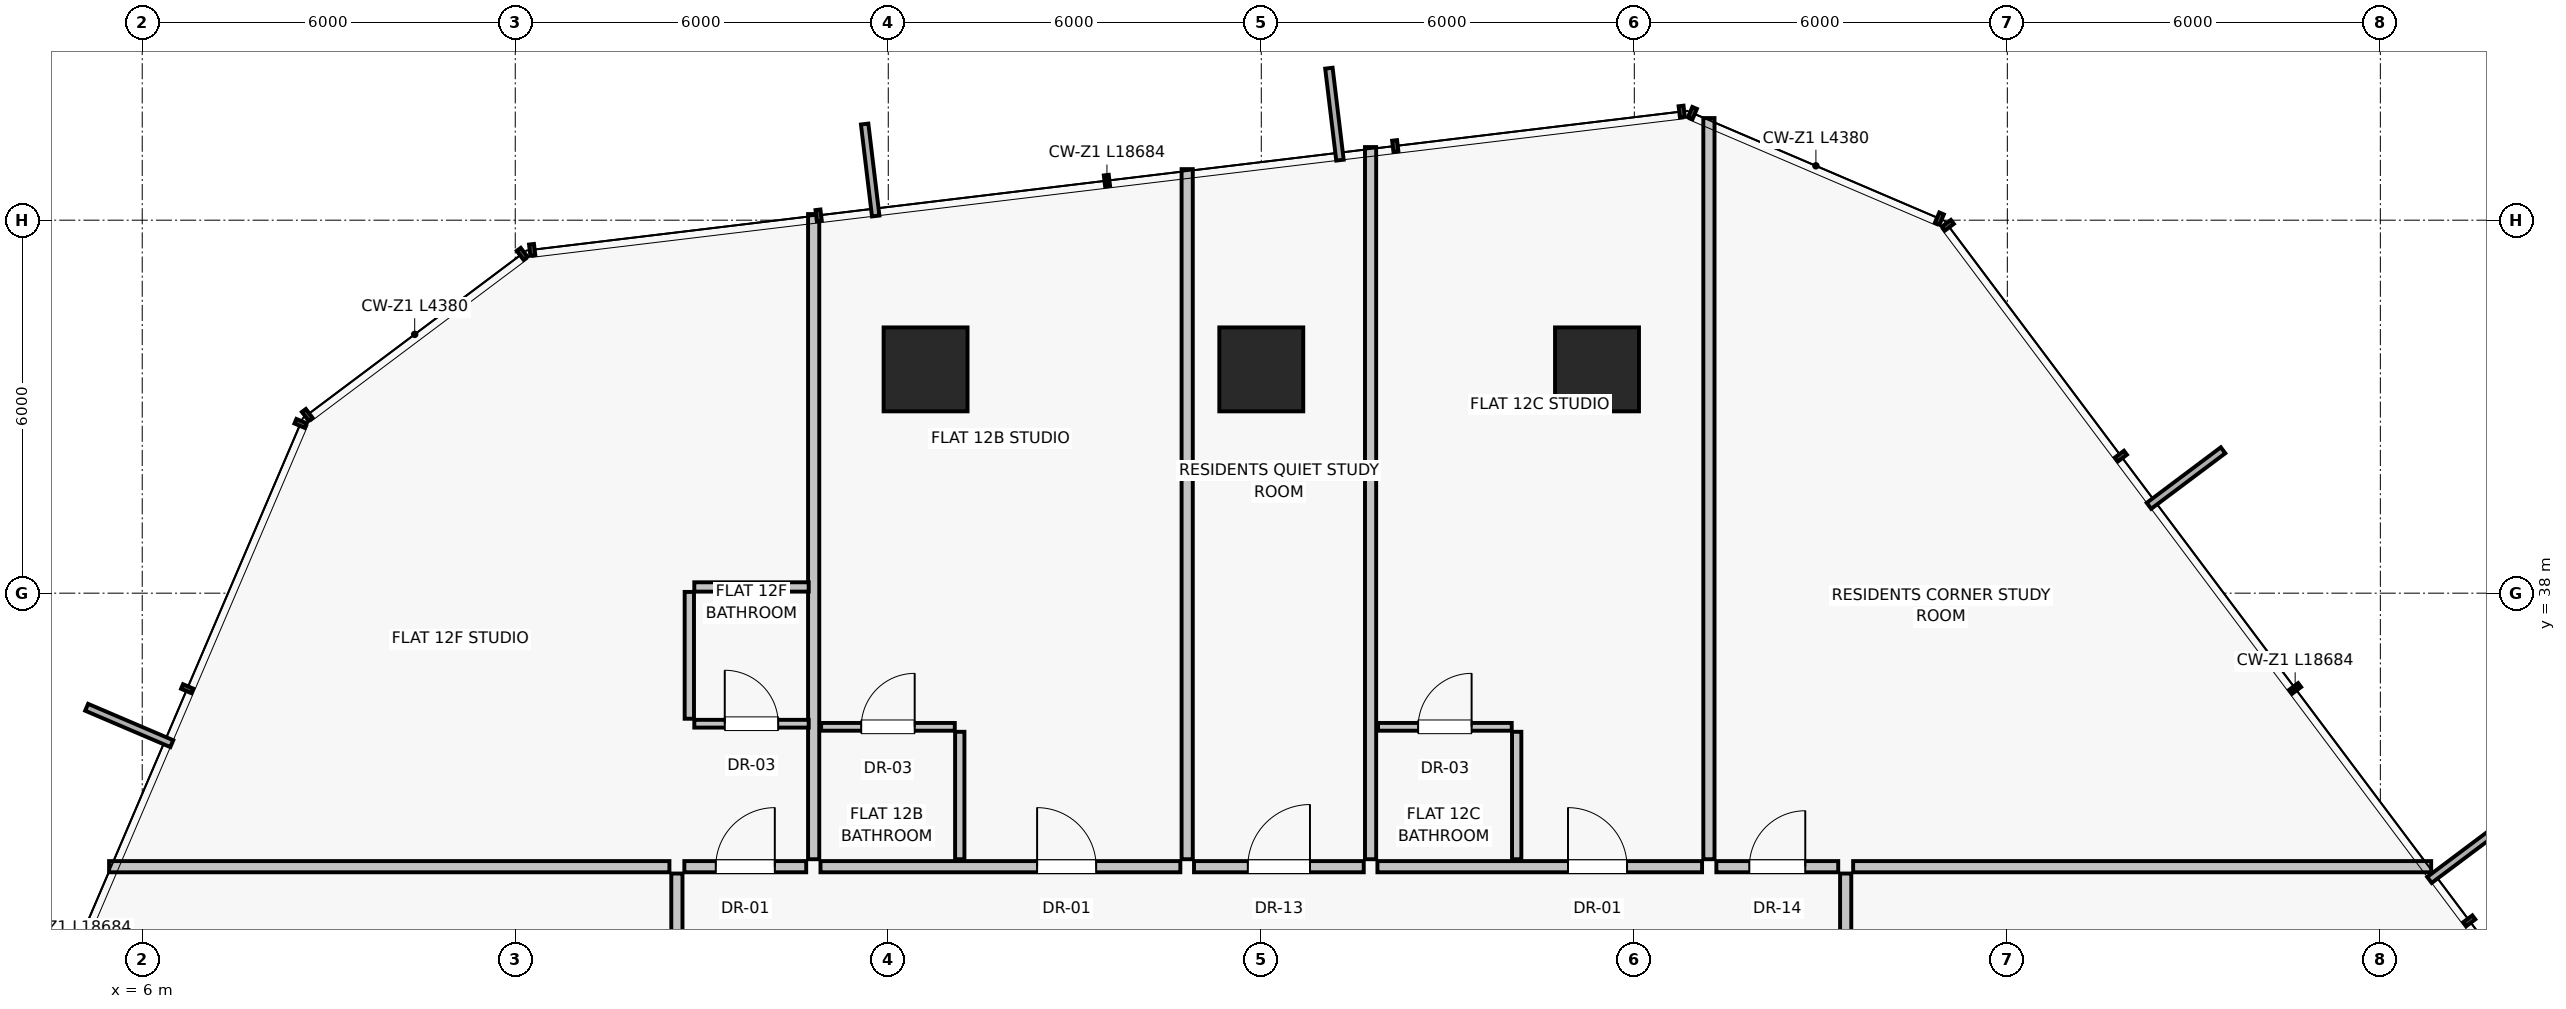
"""IFC4 building model, lengths in metres.
Left out: names, types, materials, properties, quantities, classifications, styles, units other than length and angle.
Written with IfcOpenShell. Run it as: python <this file> out.ifc"""

import sys

from ifc_helpers import new_model, si_unit, direction, frame, frame_2d, origin, origin_2d, place, context, subcontext, project, spatial, rectangle, extrude, source, transform, mapped, element, fill, save


model = new_model("IFC4")
c1 = context("Model", 3, precision=1e-05, world=origin(), true_north=direction((0.0, 1.0)))
c2 = subcontext(c1, "Body", "Model", "MODEL_VIEW")
j1 = project(units=[si_unit("LENGTHUNIT", "METRE"), si_unit("PLANEANGLEUNIT", "RADIAN")], contexts=[c1])
p1 = place(None, origin())
s1 = spatial("IfcSite", under=j1, at=p1, CompositionType="ELEMENT")
p2 = place(p1, origin())
s2 = spatial("IfcBuilding", under=s1, at=p2, CompositionType="ELEMENT")
p3 = place(p2, frame((0.0, 0.0, 46.8)))
s3 = spatial("IfcBuildingStorey", under=s2, at=p3, CompositionType="ELEMENT", Elevation=46.8)
for number, where, z_axis, x_axis in (
    (1, (29.4, 41.6, 0.0), (0.0, 0.0, 1.0), (1.0, 0.0, 0.0)),
    (2, (24.0, 41.6, 0.0), (0.0, 0.0, 1.0), (1.0, 0.0, 0.0)),
    (3, (18.6, 41.6, 0.0), (0.0, 0.0, 1.0), (1.0, 0.0, 0.0)),
):
    element("IfcColumn", number, at=place(p3, frame(where, z_axis=z_axis, x_axis=x_axis)), inside=s3, PredefinedType="COLUMN", context=c2, shape_type="SweptSolid", body=[
        extrude(rectangle(XDim=1.35, YDim=1.35, at=origin_2d()), origin(), (0.0, 0.0, 1.0), 3.25),
    ])
p4 = place(p3, frame((16.8, 33.72, 0.0), z_axis=(0.0, 0.0, 1.0), x_axis=(0.0, 1.0, 0.0)))
e4 = element("IfcWall", 4, at=p4, inside=s3, PredefinedType="PARTITIONING", context=c2, shape_type="SweptSolid", body=[
    extrude(rectangle(XDim=10.378, YDim=0.18, at=frame_2d((5.189, 0.0))), origin(), (0.0, 0.0, 1.0), 3.0),
])
p5 = place(p3, frame((31.2, 33.72, 0.0), z_axis=(0.0, 0.0, 1.0), x_axis=(0.0, 1.0, 0.0)))
e5 = element("IfcWall", 5, at=p5, inside=s3, PredefinedType="PARTITIONING", context=c2, shape_type="SweptSolid", body=[
    extrude(rectangle(XDim=11.923, YDim=0.18, at=frame_2d((5.961, 0.0))), origin(), (0.0, 0.0, 1.0), 3.0),
])
p6 = place(p3, frame((22.918, 33.6, 0.0), z_axis=(0.0, 0.0, 1.0), x_axis=(1.0, 0.0, 0.0)))
e6 = element("IfcWall", 6, at=p6, inside=s3, PredefinedType="PARTITIONING", context=c2, shape_type="SweptSolid", body=[
    extrude(rectangle(XDim=2.73, YDim=0.18, at=frame_2d((1.365, 0.0))), origin(), (0.0, 0.0, 1.0), 3.0),
])
p7 = place(p6, frame((0.865, 0.0, 0.0)))
e7 = element("IfcOpeningElement", 7, at=p7, cuts=e6, PredefinedType="OPENING", context=c2, shape_type="SweptSolid", body=[
    extrude(rectangle(XDim=1.0, YDim=2.01, at=frame_2d((0.5, 1.005))), frame((0.0, 0.1, 0.0), z_axis=(0.0, -1.0, 0.0), x_axis=(1.0, 0.0, 0.0)), (0.0, 0.0, 1.0), 0.2),
])
p8 = place(p3, frame((22.808, 33.72, 0.0), z_axis=(0.0, 0.0, 1.0), x_axis=(0.0, 1.0, 0.0)))
e8 = element("IfcWall", 8, at=p8, inside=s3, PredefinedType="PARTITIONING", context=c2, shape_type="SweptSolid", body=[
    extrude(rectangle(XDim=11.101, YDim=0.18, at=frame_2d((5.551, 0.0))), origin(), (0.0, 0.0, 1.0), 3.0),
])
p9 = place(p3, frame((16.91, 33.6, 0.0), z_axis=(0.0, 0.0, 1.0), x_axis=(1.0, 0.0, 0.0)))
e9 = element("IfcWall", 9, at=p9, inside=s3, PredefinedType="PARTITIONING", context=c2, shape_type="SweptSolid", body=[
    extrude(rectangle(XDim=5.788, YDim=0.18, at=frame_2d((2.894, 0.0))), origin(), (0.0, 0.0, 1.0), 3.0),
])
p10 = place(p9, frame((3.484, 0.0, 0.0)))
e10 = element("IfcOpeningElement", 10, at=p10, cuts=e9, PredefinedType="OPENING", context=c2, shape_type="SweptSolid", body=[
    extrude(rectangle(XDim=0.95, YDim=2.02, at=frame_2d((0.475, 1.01))), frame((0.0, 0.1, 0.0), z_axis=(0.0, -1.0, 0.0), x_axis=(1.0, 0.0, 0.0)), (0.0, 0.0, 1.0), 0.2),
])
p11 = place(p3, frame((19.15, 33.72, 0.0), z_axis=(0.0, 0.0, 1.0), x_axis=(0.0, 1.0, 0.0)))
e11 = element("IfcWall", 11, at=p11, inside=s3, PredefinedType="PARTITIONING", context=c2, shape_type="SweptSolid", body=[
    extrude(rectangle(XDim=2.05, YDim=0.15, at=frame_2d((1.025, 0.0))), origin(), (0.0, 0.0, 1.0), 3.0),
])
p12 = place(p3, frame((16.92, 35.85, 0.0), z_axis=(0.0, 0.0, 1.0), x_axis=(1.0, 0.0, 0.0)))
e12 = element("IfcWall", 12, at=p12, inside=s3, PredefinedType="PARTITIONING", context=c2, shape_type="SweptSolid", body=[
    extrude(rectangle(XDim=2.15, YDim=0.125, at=frame_2d((1.075, 0.0))), origin(), (0.0, 0.0, 1.0), 3.0),
])
p13 = place(p12, frame((0.645, 0.0, 0.0)))
e13 = element("IfcOpeningElement", 13, at=p13, cuts=e12, PredefinedType="OPENING", context=c2, shape_type="SweptSolid", body=[
    extrude(rectangle(XDim=0.86, YDim=2.01, at=frame_2d((0.43, 1.005))), frame((0.0, 0.073, 0.0), z_axis=(0.0, -1.0, 0.0), x_axis=(1.0, 0.0, 0.0)), (0.0, 0.0, 1.0), 0.145),
])
p14 = place(p3, frame((25.758, 33.72, 0.0), z_axis=(0.0, 0.0, 1.0), x_axis=(0.0, 1.0, 0.0)))
e14 = element("IfcWall", 14, at=p14, inside=s3, PredefinedType="PARTITIONING", context=c2, shape_type="SweptSolid", body=[
    extrude(rectangle(XDim=11.456, YDim=0.18, at=frame_2d((5.728, 0.0))), origin(), (0.0, 0.0, 1.0), 3.0),
])
p15 = place(p3, frame((25.868, 33.6, 0.0), z_axis=(0.0, 0.0, 1.0), x_axis=(1.0, 0.0, 0.0)))
e15 = element("IfcWall", 15, at=p15, inside=s3, PredefinedType="PARTITIONING", context=c2, shape_type="SweptSolid", body=[
    extrude(rectangle(XDim=5.222, YDim=0.18, at=frame_2d((2.611, 0.0))), origin(), (0.0, 0.0, 1.0), 3.0),
])
p16 = place(p15, frame((3.065, 0.0, 0.0)))
e16 = element("IfcOpeningElement", 16, at=p16, cuts=e15, PredefinedType="OPENING", context=c2, shape_type="SweptSolid", body=[
    extrude(rectangle(XDim=0.95, YDim=2.02, at=frame_2d((0.475, 1.01))), frame((0.0, 0.1, 0.0), z_axis=(0.0, -1.0, 0.0), x_axis=(1.0, 0.0, 0.0)), (0.0, 0.0, 1.0), 0.2),
])
p17 = place(p3, frame((28.108, 33.72, 0.0), z_axis=(0.0, 0.0, 1.0), x_axis=(0.0, 1.0, 0.0)))
e17 = element("IfcWall", 17, at=p17, inside=s3, PredefinedType="PARTITIONING", context=c2, shape_type="SweptSolid", body=[
    extrude(rectangle(XDim=2.05, YDim=0.15, at=frame_2d((1.025, 0.0))), origin(), (0.0, 0.0, 1.0), 3.0),
])
p18 = place(p3, frame((25.878, 35.85, 0.0), z_axis=(0.0, 0.0, 1.0), x_axis=(1.0, 0.0, 0.0)))
e18 = element("IfcWall", 18, at=p18, inside=s3, PredefinedType="PARTITIONING", context=c2, shape_type="SweptSolid", body=[
    extrude(rectangle(XDim=2.15, YDim=0.125, at=frame_2d((1.075, 0.0))), origin(), (0.0, 0.0, 1.0), 3.0),
])
p19 = place(p18, frame((0.645, 0.0, 0.0)))
e19 = element("IfcOpeningElement", 19, at=p19, cuts=e18, PredefinedType="OPENING", context=c2, shape_type="SweptSolid", body=[
    extrude(rectangle(XDim=0.86, YDim=2.01, at=frame_2d((0.43, 1.005))), frame((0.0, 0.073, 0.0), z_axis=(0.0, -1.0, 0.0), x_axis=(1.0, 0.0, 0.0)), (0.0, 0.0, 1.0), 0.145),
])
p20 = place(p3, frame((14.48, 33.6, 0.0), z_axis=(0.0, 0.0, 1.0), x_axis=(-1.0, 0.0, 0.0)))
e20 = element("IfcWall", 20, at=p20, inside=s3, PredefinedType="PARTITIONING", context=c2, shape_type="SweptSolid", body=[
    extrude(rectangle(XDim=9.013, YDim=0.18, at=frame_2d((4.507, 0.0))), origin(), (0.0, 0.0, 1.0), 3.0),
])
p21 = place(p3, frame((14.6, 29.003, 0.0), z_axis=(0.0, 0.0, 1.0), x_axis=(0.0, 1.0, 0.0)))
e21 = element("IfcWall", 21, at=p21, inside=s3, PredefinedType="PARTITIONING", context=c2, shape_type="SweptSolid", body=[
    extrude(rectangle(XDim=4.487, YDim=0.18, at=frame_2d((2.244, 0.0))), origin(), (0.0, 0.0, 1.0), 3.0),
])
p22 = place(p21, frame((1.743, 0.0, 0.0)))
e22 = element("IfcOpeningElement", 22, at=p22, cuts=e21, PredefinedType="OPENING", context=c2, shape_type="SweptSolid", body=[
    extrude(rectangle(XDim=1.0, YDim=2.01, at=frame_2d((0.5, 1.005))), frame((0.0, 0.1, 0.0), z_axis=(0.0, -1.0, 0.0), x_axis=(1.0, 0.0, 0.0)), (0.0, 0.0, 1.0), 0.2),
])
p23 = place(p3, frame((33.52, 33.6, 0.0), z_axis=(0.0, 0.0, 1.0), x_axis=(1.0, 0.0, 0.0)))
e23 = element("IfcWall", 23, at=p23, inside=s3, PredefinedType="PARTITIONING", context=c2, shape_type="SweptSolid", body=[
    extrude(rectangle(XDim=9.297, YDim=0.18, at=frame_2d((4.649, 0.0))), origin(), (0.0, 0.0, 1.0), 3.0),
])
p24 = place(p3, frame((33.4, 29.325, 0.0), z_axis=(0.0, 0.0, 1.0), x_axis=(0.0, 1.0, 0.0)))
e24 = element("IfcWall", 24, at=p24, inside=s3, PredefinedType="PARTITIONING", context=c2, shape_type="SweptSolid", body=[
    extrude(rectangle(XDim=4.165, YDim=0.18, at=frame_2d((2.083, 0.0))), origin(), (0.0, 0.0, 1.0), 3.0),
])
p25 = place(p24, frame((1.583, 0.0, 0.0)))
e25 = element("IfcOpeningElement", 25, at=p25, cuts=e24, PredefinedType="OPENING", context=c2, shape_type="SweptSolid", body=[
    extrude(rectangle(XDim=1.0, YDim=2.01, at=frame_2d((0.5, 1.005))), frame((0.0, 0.1, 0.0), z_axis=(0.0, -1.0, 0.0), x_axis=(1.0, 0.0, 0.0)), (0.0, 0.0, 1.0), 0.2),
])
p26 = place(p3, frame((14.72, 33.6, 0.0), z_axis=(0.0, 0.0, 1.0), x_axis=(1.0, 0.0, 0.0)))
e26 = element("IfcWall", 26, at=p26, inside=s3, PredefinedType="PARTITIONING", context=c2, shape_type="SweptSolid", body=[
    extrude(rectangle(XDim=1.96, YDim=0.18, at=frame_2d((0.98, 0.0))), origin(), (0.0, 0.0, 1.0), 3.0),
])
p27 = place(p26, frame((0.505, 0.0, 0.0)))
e27 = element("IfcOpeningElement", 27, at=p27, cuts=e26, PredefinedType="OPENING", context=c2, shape_type="SweptSolid", body=[
    extrude(rectangle(XDim=0.95, YDim=2.02, at=frame_2d((0.475, 1.01))), frame((0.0, 0.1, 0.0), z_axis=(0.0, -1.0, 0.0), x_axis=(1.0, 0.0, 0.0)), (0.0, 0.0, 1.0), 0.2),
])
p28 = place(p3, frame((14.88, 35.9, 0.0), z_axis=(0.0, 0.0, 1.0), x_axis=(1.0, 0.0, 0.0)))
e28 = element("IfcWall", 28, at=p28, inside=s3, PredefinedType="PARTITIONING", context=c2, shape_type="SweptSolid", body=[
    extrude(rectangle(XDim=1.84, YDim=0.125, at=frame_2d((0.92, 0.0))), origin(), (0.0, 0.0, 1.0), 3.0),
])
p29 = place(p28, frame((0.49, 0.0, 0.0)))
e29 = element("IfcOpeningElement", 29, at=p29, cuts=e28, PredefinedType="OPENING", context=c2, shape_type="SweptSolid", body=[
    extrude(rectangle(XDim=0.86, YDim=2.01, at=frame_2d((0.43, 1.005))), frame((0.0, 0.073, 0.0), z_axis=(0.0, -1.0, 0.0), x_axis=(1.0, 0.0, 0.0)), (0.0, 0.0, 1.0), 0.145),
])
p30 = place(p3, frame((14.88, 38.1, 0.0), z_axis=(0.0, 0.0, 1.0), x_axis=(1.0, 0.0, 0.0)))
e30 = element("IfcWall", 30, at=p30, inside=s3, PredefinedType="PARTITIONING", context=c2, shape_type="SweptSolid", body=[
    extrude(rectangle(XDim=1.84, YDim=0.15, at=frame_2d((0.92, 0.0))), origin(), (0.0, 0.0, 1.0), 3.0),
])
p31 = place(p3, frame((14.8, 35.98, 0.0), z_axis=(0.0, 0.0, 1.0), x_axis=(0.0, 1.0, 0.0)))
e31 = element("IfcWall", 31, at=p31, inside=s3, PredefinedType="PARTITIONING", context=c2, shape_type="SweptSolid", body=[
    extrude(rectangle(XDim=2.04, YDim=0.15, at=frame_2d((1.02, 0.0))), origin(), (0.0, 0.0, 1.0), 3.0),
])
p32 = place(p3, frame((31.32, 33.6, 0.0), z_axis=(0.0, 0.0, 1.0), x_axis=(1.0, 0.0, 0.0)))
e32 = element("IfcWall", 32, at=p32, inside=s3, PredefinedType="PARTITIONING", context=c2, shape_type="SweptSolid", body=[
    extrude(rectangle(XDim=1.96, YDim=0.18, at=frame_2d((0.98, 0.0))), origin(), (0.0, 0.0, 1.0), 3.0),
])
p33 = place(p32, frame((0.53, 0.0, 0.0)))
e33 = element("IfcOpeningElement", 33, at=p33, cuts=e32, PredefinedType="OPENING", context=c2, shape_type="SweptSolid", body=[
    extrude(rectangle(XDim=0.9, YDim=2.01, at=frame_2d((0.45, 1.005))), frame((0.0, 0.1, 0.0), z_axis=(0.0, -1.0, 0.0), x_axis=(1.0, 0.0, 0.0)), (0.0, 0.0, 1.0), 0.2),
])
m1 = source(origin(), c2, "Body", "SweptSolid", [
    extrude(rectangle(XDim=1.0, YDim=2.01, at=frame_2d((0.5, 1.005))), frame((0.0, 0.025, 0.0), z_axis=(0.0, -1.0, 0.0), x_axis=(1.0, 0.0, 0.0)), (0.0, 0.0, 1.0), 0.05),
])
p34 = place(p7, origin())
e34 = element("IfcDoor", 34, at=p34, inside=s3, OperationType="SINGLE_SWING_RIGHT", PredefinedType="DOOR", context=c2, shape_type="MappedRepresentation", body=[
    mapped(m1, transform((0.0, 0.0, 0.0), scale=1.0)),
])
fill(e7, e34)
m2 = source(origin(), c2, "Body", "SweptSolid", [
    extrude(rectangle(XDim=0.95, YDim=2.02, at=frame_2d((0.475, 1.01))), frame((0.0, 0.025, 0.0), z_axis=(0.0, -1.0, 0.0), x_axis=(1.0, 0.0, 0.0)), (0.0, 0.0, 1.0), 0.05),
])
p35 = place(p10, origin())
e35 = element("IfcDoor", 35, at=p35, inside=s3, OperationType="SINGLE_SWING_LEFT", PredefinedType="DOOR", context=c2, shape_type="MappedRepresentation", body=[
    mapped(m2, transform((0.0, 0.0, 0.0), scale=1.0)),
])
fill(e10, e35)
m3 = source(origin(), c2, "Body", "SweptSolid", [
    extrude(rectangle(XDim=0.86, YDim=2.01, at=frame_2d((0.43, 1.005))), frame((0.0, 0.025, 0.0), z_axis=(0.0, -1.0, 0.0), x_axis=(1.0, 0.0, 0.0)), (0.0, 0.0, 1.0), 0.05),
])
p36 = place(p13, origin())
e36 = element("IfcDoor", 36, at=p36, inside=s3, OperationType="SINGLE_SWING_RIGHT", PredefinedType="DOOR", context=c2, shape_type="MappedRepresentation", body=[
    mapped(m3, transform((0.0, 0.0, 0.0), scale=1.0)),
])
fill(e13, e36)
p37 = place(p16, origin())
e37 = element("IfcDoor", 37, at=p37, inside=s3, OperationType="SINGLE_SWING_LEFT", PredefinedType="DOOR", context=c2, shape_type="MappedRepresentation", body=[
    mapped(m2, transform((0.0, 0.0, 0.0), scale=1.0)),
])
fill(e16, e37)
p38 = place(p19, origin())
e38 = element("IfcDoor", 38, at=p38, inside=s3, OperationType="SINGLE_SWING_RIGHT", PredefinedType="DOOR", context=c2, shape_type="MappedRepresentation", body=[
    mapped(m3, transform((0.0, 0.0, 0.0), scale=1.0)),
])
fill(e19, e38)
p39 = place(p27, origin())
e39 = element("IfcDoor", 39, at=p39, inside=s3, OperationType="SINGLE_SWING_RIGHT", PredefinedType="DOOR", context=c2, shape_type="MappedRepresentation", body=[
    mapped(m2, transform((0.0, 0.0, 0.0), scale=1.0)),
])
fill(e27, e39)
p40 = place(p29, origin())
e40 = element("IfcDoor", 40, at=p40, inside=s3, OperationType="SINGLE_SWING_LEFT", PredefinedType="DOOR", context=c2, shape_type="MappedRepresentation", body=[
    mapped(m3, transform((0.0, 0.0, 0.0), scale=1.0)),
])
fill(e29, e40)
m4 = source(origin(), c2, "Body", "SweptSolid", [
    extrude(rectangle(XDim=0.9, YDim=2.01, at=frame_2d((0.45, 1.005))), frame((0.0, 0.025, 0.0), z_axis=(0.0, -1.0, 0.0), x_axis=(1.0, 0.0, 0.0)), (0.0, 0.0, 1.0), 0.05),
])
p41 = place(p33, origin())
e41 = element("IfcDoor", 41, at=p41, inside=s3, OperationType="SINGLE_SWING_RIGHT", PredefinedType="DOOR", context=c2, shape_type="MappedRepresentation", body=[
    mapped(m4, transform((0.0, 0.0, 0.0), scale=1.0)),
])
fill(e33, e41)
save(model, sys.argv[1])
